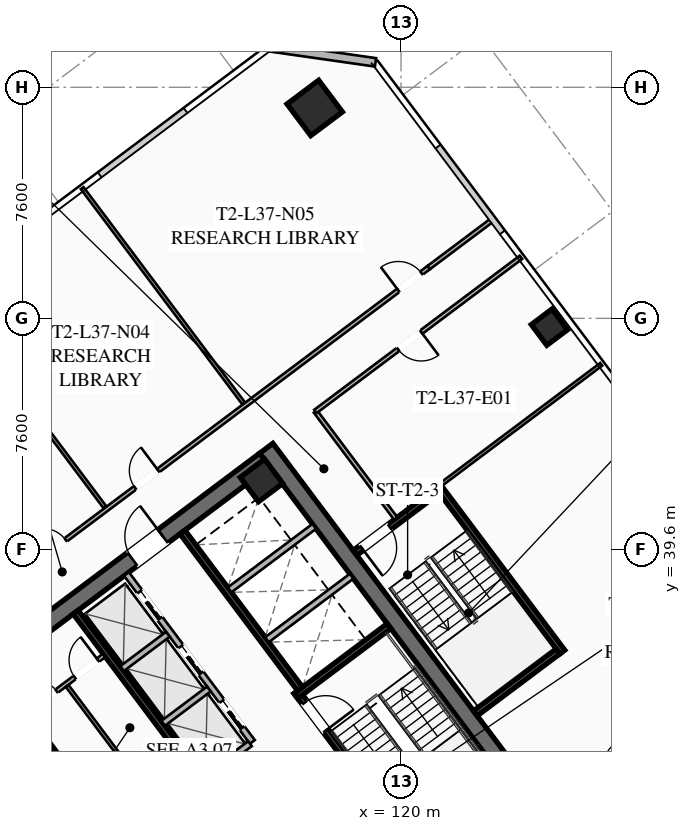
"""IFC4 building model, lengths in metres.
Left out: names, types, materials, properties, quantities, classifications, styles, units other than length and angle.
Written with IfcOpenShell. Run it as: python <this file> out.ifc"""

import sys

from ifc_helpers import new_model, si_unit, direction, frame, frame_2d, origin, origin_2d, place, context, subcontext, project, spatial, rectangle, hollow_rectangle, extrude, element, fill, save


model = new_model("IFC4")
c1 = context("Model", 3, precision=1e-05, world=origin(), true_north=direction((0.0, 1.0)))
c2 = subcontext(c1, "Body", "Model", "MODEL_VIEW")
j1 = project(units=[si_unit("LENGTHUNIT", "METRE"), si_unit("PLANEANGLEUNIT", "RADIAN")], contexts=[c1])
p1 = place(None, origin())
s1 = spatial("IfcSite", under=j1, at=p1, CompositionType="ELEMENT")
p2 = place(p1, origin())
s2 = spatial("IfcBuilding", under=s1, at=p2, CompositionType="ELEMENT")
p3 = place(p2, frame((0.0, 0.0, 139.25)))
s3 = spatial("IfcBuildingStorey", under=s2, at=p3, CompositionType="ELEMENT", Elevation=139.25)
for number, where, z_axis, x_axis in (
    (1, (112.436, 21.077, 0.0), (0.0, 0.0, 1.0), (-0.6, 0.8, 0.0)),
    (2, (115.564, 42.923, 0.0), (0.0, 0.0, 1.0), (0.6, -0.8, 0.0)),
):
    element("IfcWall", number, at=place(p3, frame(where, z_axis=z_axis, x_axis=x_axis)), inside=s3, PredefinedType="SHEAR", context=c2, shape_type="SweptSolid", body=[
        extrude(rectangle(XDim=15.6, YDim=0.55, at=frame_2d((7.8, 0.0))), origin(), (0.0, 0.0, 1.0), 3.55),
    ])
p4 = place(p3, frame((103.461, 33.502, 0.0), z_axis=(0.0, 0.0, 1.0), x_axis=(0.799998054672, 0.600002593761, 0.0)))
e3 = element("IfcWall", 3, at=p4, inside=s3, PredefinedType="SHEAR", context=c2, shape_type="SweptSolid", body=[
    extrude(rectangle(XDim=15.06, YDim=0.55, at=frame_2d((7.53, 0.0))), origin(), (0.0, 0.0, 1.0), 3.55),
])
p5 = place(p4, frame((4.58, 0.0, 0.0)))
e4 = element("IfcOpeningElement", 4, at=p5, cuts=e3, PredefinedType="OPENING", context=c2, shape_type="SweptSolid", body=[
    extrude(rectangle(XDim=1.25, YDim=2.25, at=frame_2d((0.625, 1.125))), frame((0.0, 0.285, 0.0), z_axis=(0.0, -1.0, 0.0), x_axis=(1.0, 0.0, 0.0)), (0.0, 0.0, 1.0), 0.57),
])
p6 = place(p4, frame((9.63, 0.0, 0.0)))
e5 = element("IfcOpeningElement", 5, at=p6, cuts=e3, PredefinedType="OPENING", context=c2, shape_type="SweptSolid", body=[
    extrude(rectangle(XDim=1.25, YDim=2.25, at=frame_2d((0.625, 1.125))), frame((0.0, 0.285, 0.0), z_axis=(0.0, -1.0, 0.0), x_axis=(1.0, 0.0, 0.0)), (0.0, 0.0, 1.0), 0.57),
])
p7 = place(p3, frame((115.41, 41.87, 0.0), z_axis=(0.0, 0.0, 1.0), x_axis=(0.799999996291, 0.600000004945, 0.0)))
e6 = element("IfcColumn", 6, at=p7, inside=s3, PredefinedType="COLUMN", context=c2, shape_type="SweptSolid", body=[
    extrude(hollow_rectangle(XDim=1.0, YDim=1.0, WallThickness=0.04, at=origin_2d()), origin(), (0.0, 0.0, 1.0), 3.37),
])
p8 = place(p3, frame((117.16, 54.12, 0.0), z_axis=(0.0, 0.0, 1.0), x_axis=(0.799999996291, 0.600000004945, 0.0)))
e7 = element("IfcColumn", 7, at=p8, inside=s3, PredefinedType="COLUMN", context=c2, shape_type="SweptSolid", body=[
    extrude(hollow_rectangle(XDim=1.3, YDim=1.3, WallThickness=0.05, at=origin_2d()), origin(), (0.0, 0.0, 1.0), 3.37),
])
p9 = place(p3, frame((124.88, 46.91, 0.0), z_axis=(0.0, 0.0, 1.0), x_axis=(0.799999996291, 0.600000004945, 0.0)))
e8 = element("IfcColumn", 8, at=p9, inside=s3, PredefinedType="COLUMN", context=c2, shape_type="SweptSolid", body=[
    extrude(hollow_rectangle(XDim=0.85, YDim=0.85, WallThickness=0.035, at=origin_2d()), origin(), (0.0, 0.0, 1.0), 3.37),
])
p10 = place(p3, frame((115.66, 56.12, 0.0), z_axis=(0.0, 0.0, 1.0), x_axis=(0.989949493661, -0.141421356237, 0.0)))
e9 = element("IfcWall", 9, at=p10, inside=s3, PredefinedType="SOLIDWALL", context=c2, shape_type="SweptSolid", body=[
    extrude(rectangle(XDim=3.536, YDim=0.28, at=frame_2d((1.768, 0.0))), origin(), (0.0, 0.0, 1.0), 3.37),
])
p11 = place(p3, frame((111.44, 29.08, 0.0), z_axis=(0.0, 0.0, 1.0), x_axis=(-0.59999029481, 0.8000072788, 0.0)))
e10 = element("IfcWall", 10, at=p11, inside=s3, PredefinedType="SHEAR", context=c2, shape_type="SweptSolid", body=[
    extrude(rectangle(XDim=8.05, YDim=0.2, at=frame_2d((4.025, 0.0))), origin(), (0.0, 0.0, 1.0), 3.37),
])
p12 = place(p11, frame((0.45, 0.0, 0.0)))
e11 = element("IfcOpeningElement", 11, at=p12, cuts=e10, PredefinedType="OPENING", context=c2, shape_type="SweptSolid", body=[
    extrude(rectangle(XDim=1.15, YDim=2.2, at=frame_2d((0.575, 1.1))), frame((0.0, 0.11, 0.0), z_axis=(0.0, -1.0, 0.0), x_axis=(1.0, 0.0, 0.0)), (0.0, 0.0, 1.0), 0.22),
])
p13 = place(p3, frame((116.56, 34.92, 0.0), z_axis=(0.0, 0.0, 1.0), x_axis=(0.59999029481, -0.8000072788, 0.0)))
e12 = element("IfcWall", 12, at=p13, inside=s3, PredefinedType="SHEAR", context=c2, shape_type="SweptSolid", body=[
    extrude(rectangle(XDim=8.05, YDim=0.2, at=frame_2d((4.025, 0.0))), origin(), (0.0, 0.0, 1.0), 3.37),
])
p14 = place(p13, frame((0.45, 0.0, 0.0)))
e13 = element("IfcOpeningElement", 13, at=p14, cuts=e12, PredefinedType="OPENING", context=c2, shape_type="SweptSolid", body=[
    extrude(rectangle(XDim=1.15, YDim=2.2, at=frame_2d((0.575, 1.1))), frame((0.0, 0.11, 0.0), z_axis=(0.0, -1.0, 0.0), x_axis=(1.0, 0.0, 0.0)), (0.0, 0.0, 1.0), 0.22),
])
p15 = place(p3, frame((116.54, 34.78, 0.0), z_axis=(0.0, 0.0, 1.0), x_axis=(0.800015298837, 0.599979601008, 0.0)))
e14 = element("IfcWall", 14, at=p15, inside=s3, PredefinedType="SHEAR", context=c2, shape_type="SweptSolid", body=[
    extrude(rectangle(XDim=3.83, YDim=0.2, at=frame_2d((1.915, 0.0))), origin(), (0.0, 0.0, 1.0), 3.37),
])
p16 = place(p3, frame((117.998, 25.936, 0.0), z_axis=(0.0, 0.0, 1.0), x_axis=(-0.600002693989, 0.799997979501, 0.0)))
e15 = element("IfcWall", 15, at=p16, inside=s3, PredefinedType="SHEAR", context=c2, shape_type="SweptSolid", body=[
    extrude(rectangle(XDim=14.5, YDim=0.2, at=frame_2d((7.25, 0.0))), origin(), (0.0, 0.0, 1.0), 3.37),
])
p17 = place(p3, frame((110.104, 31.028, 0.0), z_axis=(0.0, 0.0, 1.0), x_axis=(0.800018601094, 0.59997519774, 0.0)))
e16 = element("IfcWall", 16, at=p17, inside=s3, PredefinedType="SOLIDWALL", context=c2, shape_type="SweptSolid", body=[
    extrude(rectangle(XDim=3.15, YDim=0.22, at=frame_2d((1.575, 0.0))), origin(), (0.0, 0.0, 1.0), 2.723),
])
p18 = place(p3, frame((112.81, 40.17, 0.0), z_axis=(0.0, 0.0, 1.0), x_axis=(0.599993943644, -0.800004542231, 0.0)))
e17 = element("IfcWall", 17, at=p18, inside=s3, PredefinedType="SHEAR", context=c2, shape_type="SweptSolid", body=[
    extrude(rectangle(XDim=6.45, YDim=0.2, at=frame_2d((3.225, 0.0))), origin(), (0.0, 0.0, 1.0), 3.37),
])
for number, where, z_axis, x_axis in (
    (18, (115.59, 36.63, 0.0), (0.0, 0.0, 1.0), (0.8, 0.6, 0.0)),
    (19, (114.36, 38.27, 0.0), (0.0, 0.0, 1.0), (0.8, 0.6, 0.0)),
):
    element("IfcWall", number, at=place(p3, frame(where, z_axis=z_axis, x_axis=x_axis)), inside=s3, PredefinedType="SOLIDWALL", context=c2, shape_type="SweptSolid", body=[
        extrude(rectangle(XDim=3.48, YDim=0.2, at=frame_2d((1.74, 0.0))), origin(), (0.0, 0.0, 1.0), 3.37),
    ])
p19 = place(p3, frame((107.71, 34.22, 0.0), z_axis=(0.0, 0.0, 1.0), x_axis=(0.799981399002, 0.60002480053, 0.0)))
e20 = element("IfcWall", 20, at=p19, inside=s3, PredefinedType="PARTITIONING", context=c2, shape_type="SweptSolid", body=[
    extrude(rectangle(XDim=3.15, YDim=0.135, at=frame_2d((1.575, 0.0))), origin(), (0.0, 0.0, 1.0), 2.723),
])
p20 = place(p19, frame((0.25, 0.0, 0.0)))
e21 = element("IfcOpeningElement", 21, at=p20, cuts=e20, PredefinedType="OPENING", context=c2, shape_type="SweptSolid", body=[
    extrude(rectangle(XDim=0.95, YDim=2.05, at=frame_2d((0.475, 1.025))), frame((0.0, 0.077, 0.0), z_axis=(0.0, -1.0, 0.0), x_axis=(1.0, 0.0, 0.0)), (0.0, 0.0, 1.0), 0.155),
])
p21 = place(p19, frame((1.95, 0.0, 0.0)))
e22 = element("IfcOpeningElement", 22, at=p21, cuts=e20, PredefinedType="OPENING", context=c2, shape_type="SweptSolid", body=[
    extrude(rectangle(XDim=0.95, YDim=2.05, at=frame_2d((0.475, 1.025))), frame((0.0, 0.077, 0.0), z_axis=(0.0, -1.0, 0.0), x_axis=(1.0, 0.0, 0.0)), (0.0, 0.0, 1.0), 0.155),
])
p22 = place(p3, frame((111.296, 32.072, 0.0), z_axis=(0.0, 0.0, 1.0), x_axis=(-0.59995887973, 0.800030838552, 0.0)))
e23 = element("IfcWall", 23, at=p22, inside=s3, PredefinedType="PARTITIONING", context=c2, shape_type="SweptSolid", body=[
    extrude(rectangle(XDim=3.8, YDim=0.11, at=frame_2d((1.9, 0.0))), origin(), (0.0, 0.0, 1.0), 2.723),
])
p23 = place(p3, frame((115.11, 33.27, 0.0), z_axis=(0.0, 0.0, 1.0), x_axis=(-0.600011322243, 0.799991508192, 0.0)))
e24 = element("IfcWall", 24, at=p23, inside=s3, PredefinedType="SOLIDWALL", context=c2, shape_type="SweptSolid", body=[
    extrude(rectangle(XDim=6.9, YDim=0.2, at=frame_2d((3.45, 0.0))), origin(), (0.0, 0.0, 1.0), 3.37),
])
p24 = place(p23, frame((0.575, 0.0, 0.0)))
e25 = element("IfcOpeningElement", 25, at=p24, cuts=e24, PredefinedType="OPENING", context=c2, shape_type="SweptSolid", body=[
    extrude(rectangle(XDim=1.1, YDim=2.2, at=frame_2d((0.55, 1.1))), frame((0.0, 0.11, 0.0), z_axis=(0.0, -1.0, 0.0), x_axis=(1.0, 0.0, 0.0)), (0.0, 0.0, 1.0), 0.22),
])
p25 = place(p23, frame((2.825, 0.0, 0.0)))
e26 = element("IfcOpeningElement", 26, at=p25, cuts=e24, PredefinedType="OPENING", context=c2, shape_type="SweptSolid", body=[
    extrude(rectangle(XDim=1.1, YDim=2.2, at=frame_2d((0.55, 1.1))), frame((0.0, 0.11, 0.0), z_axis=(0.0, -1.0, 0.0), x_axis=(1.0, 0.0, 0.0)), (0.0, 0.0, 1.0), 0.22),
])
p26 = place(p23, frame((5.075, 0.0, 0.0)))
e27 = element("IfcOpeningElement", 27, at=p26, cuts=e24, PredefinedType="OPENING", context=c2, shape_type="SweptSolid", body=[
    extrude(rectangle(XDim=1.1, YDim=2.2, at=frame_2d((0.55, 1.1))), frame((0.0, 0.11, 0.0), z_axis=(0.0, -1.0, 0.0), x_axis=(1.0, 0.0, 0.0)), (0.0, 0.0, 1.0), 0.22),
])
p27 = place(p3, frame((113.526, 32.082, 0.0), z_axis=(0.0, 0.0, 1.0), x_axis=(0.800046745961, 0.599937666993, 0.0)))
e28 = element("IfcWall", 28, at=p27, inside=s3, PredefinedType="SOLIDWALL", context=c2, shape_type="SweptSolid", body=[
    extrude(rectangle(XDim=1.88, YDim=0.2, at=frame_2d((0.94, 0.0))), origin(), (0.0, 0.0, 1.0), 3.37),
])
p28 = place(p3, frame((112.176, 33.882, 0.0), z_axis=(0.0, 0.0, 1.0), x_axis=(0.8, 0.6, 0.0)))
e29 = element("IfcWall", 29, at=p28, inside=s3, PredefinedType="SOLIDWALL", context=c2, shape_type="SweptSolid", body=[
    extrude(rectangle(XDim=1.88, YDim=0.2, at=frame_2d((0.94, 0.0))), origin(), (0.0, 0.0, 1.0), 3.37),
])
p29 = place(p3, frame((110.826, 35.682, 0.0), z_axis=(0.0, 0.0, 1.0), x_axis=(0.799984418148, 0.600020775241, 0.0)))
e30 = element("IfcWall", 30, at=p29, inside=s3, PredefinedType="SOLIDWALL", context=c2, shape_type="SweptSolid", body=[
    extrude(rectangle(XDim=1.88, YDim=0.2, at=frame_2d((0.94, 0.0))), origin(), (0.0, 0.0, 1.0), 3.37),
])
p30 = place(p3, frame((125.304, 36.228, 0.0), z_axis=(0.0, 0.0, 1.0), x_axis=(-0.59998851072, 0.800008616831, 0.0)))
e31 = element("IfcWall", 31, at=p30, inside=s3, PredefinedType="SHEAR", context=c2, shape_type="SweptSolid", body=[
    extrude(rectangle(XDim=6.8, YDim=0.2, at=frame_2d((3.4, 0.0))), origin(), (0.0, 0.0, 1.0), 3.37),
])
p31 = place(p3, frame((121.204, 41.528, 0.0), z_axis=(0.0, 0.0, 1.0), x_axis=(-0.800017232136, -0.599977023131, 0.0)))
e32 = element("IfcWall", 32, at=p31, inside=s3, PredefinedType="SHEAR", context=c2, shape_type="SweptSolid", body=[
    extrude(rectangle(XDim=3.4, YDim=0.2, at=frame_2d((1.7, 0.0))), origin(), (0.0, 0.0, 1.0), 3.37),
])
p32 = place(p31, frame((1.975, 0.0, 0.0)))
e33 = element("IfcOpeningElement", 33, at=p32, cuts=e32, PredefinedType="OPENING", context=c2, shape_type="SweptSolid", body=[
    extrude(rectangle(XDim=1.15, YDim=2.2, at=frame_2d((0.575, 1.1))), frame((0.0, 0.11, 0.0), z_axis=(0.0, -1.0, 0.0), x_axis=(1.0, 0.0, 0.0)), (0.0, 0.0, 1.0), 0.22),
])
p33 = place(p3, frame((122.444, 34.208, 0.0), z_axis=(0.0, 0.0, 1.0), x_axis=(0.79999138319, 0.600011488909, 0.0)))
e34 = element("IfcWall", 34, at=p33, inside=s3, PredefinedType="SHEAR", context=c2, shape_type="SweptSolid", body=[
    extrude(rectangle(XDim=3.4, YDim=0.2, at=frame_2d((1.7, 0.0))), origin(), (0.0, 0.0, 1.0), 3.37),
])
p34 = place(p3, frame((119.824, 40.618, 0.0), z_axis=(0.0, 0.0, 1.0), x_axis=(-0.599982243973, 0.800013316712, 0.0)))
e35 = element("IfcWall", 35, at=p34, inside=s3, PredefinedType="PARTITIONING", context=c2, shape_type="SweptSolid", body=[
    extrude(rectangle(XDim=4.4, YDim=0.135, at=frame_2d((2.2, 0.0))), origin(), (0.0, 0.0, 1.0), 2.723),
])
p35 = place(p3, frame((95.87, 30.09, 0.0), z_axis=(0.0, 0.0, 1.0), x_axis=(0.799997191971, 0.600003744021, 0.0)))
e36 = element("IfcWall", 36, at=p35, inside=s3, PredefinedType="PARTITIONING", context=c2, shape_type="SweptSolid", body=[
    extrude(rectangle(XDim=31.3, YDim=0.135, at=frame_2d((15.65, 0.0))), origin(), (0.0, 0.0, 1.0), 2.723),
])
p36 = place(p35, frame((0.3, 0.0, 0.0)))
e37 = element("IfcOpeningElement", 37, at=p36, cuts=e36, PredefinedType="OPENING", context=c2, shape_type="SweptSolid", body=[
    extrude(rectangle(XDim=0.95, YDim=2.05, at=frame_2d((0.475, 1.025))), frame((0.0, 0.077, 0.0), z_axis=(0.0, -1.0, 0.0), x_axis=(1.0, 0.0, 0.0)), (0.0, 0.0, 1.0), 0.155),
])
p37 = place(p35, frame((11.12, 0.0, 0.0)))
e38 = element("IfcOpeningElement", 38, at=p37, cuts=e36, PredefinedType="OPENING", context=c2, shape_type="SweptSolid", body=[
    extrude(rectangle(XDim=0.95, YDim=2.05, at=frame_2d((0.475, 1.025))), frame((0.0, 0.077, 0.0), z_axis=(0.0, -1.0, 0.0), x_axis=(1.0, 0.0, 0.0)), (0.0, 0.0, 1.0), 0.155),
])
p38 = place(p35, frame((15.423, 0.0, 0.0)))
e39 = element("IfcOpeningElement", 39, at=p38, cuts=e36, PredefinedType="OPENING", context=c2, shape_type="SweptSolid", body=[
    extrude(rectangle(XDim=0.95, YDim=2.05, at=frame_2d((0.475, 1.025))), frame((0.0, 0.077, 0.0), z_axis=(0.0, -1.0, 0.0), x_axis=(1.0, 0.0, 0.0)), (0.0, 0.0, 1.0), 0.155),
])
p39 = place(p35, frame((19.228, 0.0, 0.0)))
e40 = element("IfcOpeningElement", 40, at=p39, cuts=e36, PredefinedType="OPENING", context=c2, shape_type="SweptSolid", body=[
    extrude(rectangle(XDim=0.95, YDim=2.05, at=frame_2d((0.475, 1.025))), frame((0.0, 0.077, 0.0), z_axis=(0.0, -1.0, 0.0), x_axis=(1.0, 0.0, 0.0)), (0.0, 0.0, 1.0), 0.155),
])
p40 = place(p35, frame((30.05, 0.0, 0.0)))
e41 = element("IfcOpeningElement", 41, at=p40, cuts=e36, PredefinedType="OPENING", context=c2, shape_type="SweptSolid", body=[
    extrude(rectangle(XDim=0.95, YDim=2.05, at=frame_2d((0.475, 1.025))), frame((0.0, 0.077, 0.0), z_axis=(0.0, -1.0, 0.0), x_axis=(1.0, 0.0, 0.0)), (0.0, 0.0, 1.0), 0.155),
])
p41 = place(p3, frame((120.91, 48.87, 0.0), z_axis=(0.0, 0.0, 1.0), x_axis=(0.80002227902, 0.599970293491, 0.0)))
e42 = element("IfcWall", 42, at=p41, inside=s3, PredefinedType="PARTITIONING", context=c2, shape_type="SweptSolid", body=[
    extrude(rectangle(XDim=2.63, YDim=0.135, at=frame_2d((1.315, 0.0))), origin(), (0.0, 0.0, 1.0), 2.723),
])
p42 = place(p3, frame((110.262, 40.984, 0.0), z_axis=(0.0, 0.0, 1.0), x_axis=(-0.6, 0.8, 0.0)))
e43 = element("IfcWall", 43, at=p42, inside=s3, PredefinedType="PARTITIONING", context=c2, shape_type="SweptSolid", body=[
    extrude(rectangle(XDim=8.85, YDim=0.11, at=frame_2d((4.425, 0.0))), origin(), (0.0, 0.0, 1.0), 2.723),
])
p43 = place(p3, frame((114.822, 44.404, 0.0), z_axis=(0.0, 0.0, 1.0), x_axis=(-0.600013241589, 0.799990068637, 0.0)))
e44 = element("IfcWall", 44, at=p43, inside=s3, PredefinedType="PARTITIONING", context=c2, shape_type="SweptSolid", body=[
    extrude(rectangle(XDim=8.85, YDim=0.11, at=frame_2d((4.425, 0.0))), origin(), (0.0, 0.0, 1.0), 2.723),
])
p44 = place(p3, frame((132.352, 33.614, 0.0), z_axis=(0.0, 0.0, 1.0), x_axis=(-0.8, -0.6, 0.0)))
e45 = element("IfcWall", 45, at=p44, inside=s3, PredefinedType="PARTITIONING", context=c2, shape_type="SweptSolid", body=[
    extrude(rectangle(XDim=31.3, YDim=0.135, at=frame_2d((15.65, 0.0))), origin(), (0.0, 0.0, 1.0), 2.723),
])
p45 = place(p44, frame((29.97, 0.0, 0.0)))
e46 = element("IfcOpeningElement", 46, at=p45, cuts=e45, PredefinedType="OPENING", context=c2, shape_type="SweptSolid", body=[
    extrude(rectangle(XDim=0.95, YDim=2.05, at=frame_2d((0.475, 1.025))), frame((0.0, 0.077, 0.0), z_axis=(0.0, -1.0, 0.0), x_axis=(1.0, 0.0, 0.0)), (0.0, 0.0, 1.0), 0.155),
])
p46 = place(p44, frame((14.968, 0.0, 0.0)))
e47 = element("IfcOpeningElement", 47, at=p46, cuts=e45, PredefinedType="OPENING", context=c2, shape_type="SweptSolid", body=[
    extrude(rectangle(XDim=0.95, YDim=2.05, at=frame_2d((0.475, 1.025))), frame((0.0, 0.077, 0.0), z_axis=(0.0, -1.0, 0.0), x_axis=(1.0, 0.0, 0.0)), (0.0, 0.0, 1.0), 0.155),
])
p47 = place(p44, frame((0.38, 0.0, 0.0)))
e48 = element("IfcOpeningElement", 48, at=p47, cuts=e45, PredefinedType="OPENING", context=c2, shape_type="SweptSolid", body=[
    extrude(rectangle(XDim=0.95, YDim=2.05, at=frame_2d((0.475, 1.025))), frame((0.0, 0.077, 0.0), z_axis=(0.0, -1.0, 0.0), x_axis=(1.0, 0.0, 0.0)), (0.0, 0.0, 1.0), 0.155),
])
p48 = place(p3, frame((123.944, 49.208, 0.0), z_axis=(0.0, 0.0, 1.0), x_axis=(-0.799996532921, -0.600004622744, 0.0)))
e49 = element("IfcWall", 49, at=p48, inside=s3, PredefinedType="PARTITIONING", context=c2, shape_type="SweptSolid", body=[
    extrude(rectangle(XDim=8.45, YDim=0.135, at=frame_2d((4.225, 0.0))), origin(), (0.0, 0.0, 1.0), 2.723),
])
p49 = place(p48, frame((4.1, 0.0, 0.0)))
e50 = element("IfcOpeningElement", 50, at=p49, cuts=e49, PredefinedType="OPENING", context=c2, shape_type="SweptSolid", body=[
    extrude(rectangle(XDim=0.95, YDim=2.05, at=frame_2d((0.475, 1.025))), frame((0.0, 0.077, 0.0), z_axis=(0.0, -1.0, 0.0), x_axis=(1.0, 0.0, 0.0)), (0.0, 0.0, 1.0), 0.155),
])
p50 = place(p3, frame((125.208, 30.656, 0.0), z_axis=(0.0, 0.0, 1.0), x_axis=(0.799997105034, 0.600003859935, 0.0)))
e51 = element("IfcWall", 51, at=p50, inside=s3, PredefinedType="PARTITIONING", context=c2, shape_type="SweptSolid", body=[
    extrude(rectangle(XDim=10.12, YDim=0.135, at=frame_2d((5.06, 0.0))), origin(), (0.0, 0.0, 1.0), 2.723),
])
p51 = place(p50, frame((2.045, 0.0, 0.0)))
e52 = element("IfcOpeningElement", 52, at=p51, cuts=e51, PredefinedType="OPENING", context=c2, shape_type="SweptSolid", body=[
    extrude(rectangle(XDim=0.95, YDim=2.05, at=frame_2d((0.475, 1.025))), frame((0.0, 0.077, 0.0), z_axis=(0.0, -1.0, 0.0), x_axis=(1.0, 0.0, 0.0)), (0.0, 0.0, 1.0), 0.155),
])
p52 = place(p3, frame((126.584, 45.688, 0.0), z_axis=(0.0, 0.0, 1.0), x_axis=(-0.800004438899, -0.599994081423, 0.0)))
e53 = element("IfcWall", 53, at=p52, inside=s3, PredefinedType="PARTITIONING", context=c2, shape_type="SweptSolid", body=[
    extrude(rectangle(XDim=6.6, YDim=0.11, at=frame_2d((3.3, 0.0))), origin(), (0.0, 0.0, 1.0), 2.723),
])
p53 = place(p3, frame((112.104, 20.928, 0.0), z_axis=(0.0, 0.0, 1.0), x_axis=(-0.599994940075, 0.800003794918, 0.0)))
e54 = element("IfcWall", 54, at=p53, inside=s3, PredefinedType="PARTITIONING", context=c2, shape_type="SweptSolid", body=[
    extrude(rectangle(XDim=15.44, YDim=0.135, at=frame_2d((7.72, 0.0))), origin(), (0.0, 0.0, 1.0), 2.723),
])
p54 = place(p6, origin())
e55 = element("IfcDoor", 55, at=p54, inside=s3, OperationType="SINGLE_SWING_RIGHT", PredefinedType="DOOR", context=c2, shape_type="SweptSolid", body=[
    extrude(rectangle(XDim=1.25, YDim=2.25, at=frame_2d((0.625, 1.125))), frame((0.0, 0.025, 0.0), z_axis=(0.0, -1.0, 0.0), x_axis=(1.0, 0.0, 0.0)), (0.0, 0.0, 1.0), 0.05),
])
fill(e5, e55)
p55 = place(p14, origin())
e56 = element("IfcDoor", 56, at=p55, inside=s3, OperationType="SINGLE_SWING_RIGHT", PredefinedType="DOOR", context=c2, shape_type="SweptSolid", body=[
    extrude(rectangle(XDim=1.15, YDim=2.2, at=frame_2d((0.575, 1.1))), frame((0.0, 0.025, 0.0), z_axis=(0.0, -1.0, 0.0), x_axis=(1.0, 0.0, 0.0)), (0.0, 0.0, 1.0), 0.05),
])
fill(e13, e56)
p56 = place(p20, origin())
e57 = element("IfcDoor", 57, at=p56, inside=s3, OperationType="SINGLE_SWING_LEFT", PredefinedType="DOOR", context=c2, shape_type="SweptSolid", body=[
    extrude(rectangle(XDim=0.95, YDim=2.05, at=frame_2d((0.475, 1.025))), frame((0.0, 0.025, 0.0), z_axis=(0.0, -1.0, 0.0), x_axis=(1.0, 0.0, 0.0)), (0.0, 0.0, 1.0), 0.05),
])
fill(e21, e57)
p57 = place(p21, origin())
e58 = element("IfcDoor", 58, at=p57, inside=s3, OperationType="SINGLE_SWING_RIGHT", PredefinedType="DOOR", context=c2, shape_type="SweptSolid", body=[
    extrude(rectangle(XDim=0.95, YDim=2.05, at=frame_2d((0.475, 1.025))), frame((0.0, 0.025, 0.0), z_axis=(0.0, -1.0, 0.0), x_axis=(1.0, 0.0, 0.0)), (0.0, 0.0, 1.0), 0.05),
])
fill(e22, e58)
p58 = place(p32, origin())
e59 = element("IfcDoor", 59, at=p58, inside=s3, OperationType="SINGLE_SWING_RIGHT", PredefinedType="DOOR", context=c2, shape_type="SweptSolid", body=[
    extrude(rectangle(XDim=1.15, YDim=2.2, at=frame_2d((0.575, 1.1))), frame((0.0, 0.025, 0.0), z_axis=(0.0, -1.0, 0.0), x_axis=(1.0, 0.0, 0.0)), (0.0, 0.0, 1.0), 0.05),
])
fill(e33, e59)
p59 = place(p38, origin())
e60 = element("IfcDoor", 60, at=p59, inside=s3, OperationType="SINGLE_SWING_LEFT", PredefinedType="DOOR", context=c2, shape_type="SweptSolid", body=[
    extrude(rectangle(XDim=0.95, YDim=2.05, at=frame_2d((0.475, 1.025))), frame((0.0, 0.025, 0.0), z_axis=(0.0, -1.0, 0.0), x_axis=(1.0, 0.0, 0.0)), (0.0, 0.0, 1.0), 0.05),
])
fill(e39, e60)
p60 = place(p39, origin())
e61 = element("IfcDoor", 61, at=p60, inside=s3, OperationType="SINGLE_SWING_RIGHT", PredefinedType="DOOR", context=c2, shape_type="SweptSolid", body=[
    extrude(rectangle(XDim=0.95, YDim=2.05, at=frame_2d((0.475, 1.025))), frame((0.0, 0.025, 0.0), z_axis=(0.0, -1.0, 0.0), x_axis=(1.0, 0.0, 0.0)), (0.0, 0.0, 1.0), 0.05),
])
fill(e40, e61)
p61 = place(p40, origin())
e62 = element("IfcDoor", 62, at=p61, inside=s3, OperationType="SINGLE_SWING_LEFT", PredefinedType="DOOR", context=c2, shape_type="SweptSolid", body=[
    extrude(rectangle(XDim=0.95, YDim=2.05, at=frame_2d((0.475, 1.025))), frame((0.0, 0.025, 0.0), z_axis=(0.0, -1.0, 0.0), x_axis=(1.0, 0.0, 0.0)), (0.0, 0.0, 1.0), 0.05),
])
fill(e41, e62)
p62 = place(p49, origin())
e63 = element("IfcDoor", 63, at=p62, inside=s3, OperationType="SINGLE_SWING_LEFT", PredefinedType="DOOR", context=c2, shape_type="SweptSolid", body=[
    extrude(rectangle(XDim=0.95, YDim=2.05, at=frame_2d((0.475, 1.025))), frame((0.0, 0.025, 0.0), z_axis=(0.0, -1.0, 0.0), x_axis=(1.0, 0.0, 0.0)), (0.0, 0.0, 1.0), 0.05),
])
fill(e50, e63)
p63 = place(p24, origin())
e64 = element("IfcDoor", 64, at=p63, inside=s3, OperationType="SLIDING_TO_LEFT", PredefinedType="DOOR", context=c2, shape_type="SweptSolid", body=[
    extrude(rectangle(XDim=1.1, YDim=2.2, at=frame_2d((0.55, 1.1))), frame((0.0, 0.025, 0.0), z_axis=(0.0, -1.0, 0.0), x_axis=(1.0, 0.0, 0.0)), (0.0, 0.0, 1.0), 0.05),
])
fill(e25, e64)
p64 = place(p25, origin())
e65 = element("IfcDoor", 65, at=p64, inside=s3, OperationType="SLIDING_TO_LEFT", PredefinedType="DOOR", context=c2, shape_type="SweptSolid", body=[
    extrude(rectangle(XDim=1.1, YDim=2.2, at=frame_2d((0.55, 1.1))), frame((0.0, 0.025, 0.0), z_axis=(0.0, -1.0, 0.0), x_axis=(1.0, 0.0, 0.0)), (0.0, 0.0, 1.0), 0.05),
])
fill(e26, e65)
p65 = place(p26, origin())
e66 = element("IfcDoor", 66, at=p65, inside=s3, OperationType="SLIDING_TO_LEFT", PredefinedType="DOOR", context=c2, shape_type="SweptSolid", body=[
    extrude(rectangle(XDim=1.1, YDim=2.2, at=frame_2d((0.55, 1.1))), frame((0.0, 0.025, 0.0), z_axis=(0.0, -1.0, 0.0), x_axis=(1.0, 0.0, 0.0)), (0.0, 0.0, 1.0), 0.05),
])
fill(e27, e66)
save(model, sys.argv[1])
